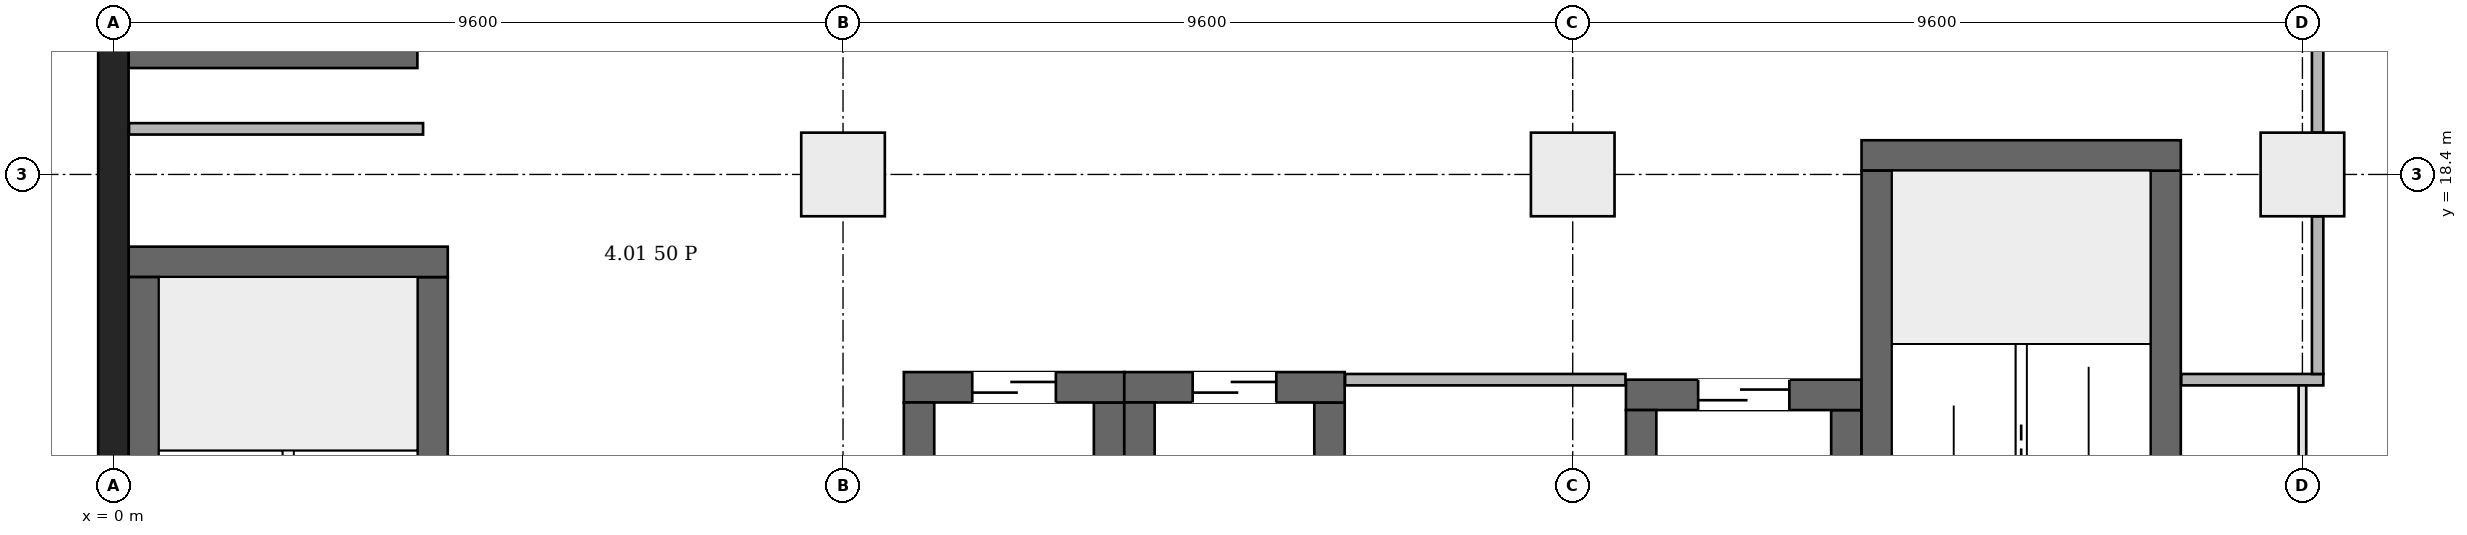
"""IFC4 building model, lengths in metres.
Left out: names, types, materials, properties, quantities, classifications, styles, units other than length and angle.
Written with IfcOpenShell. Run it as: python <this file> out.ifc"""

import sys

from ifc_helpers import new_model, si_unit, direction, frame, frame_2d, origin, origin_2d, place, context, subcontext, project, spatial, rectangle, extrude, element, fill, save


model = new_model("IFC4")
c1 = context("Model", 3, precision=1e-05, world=origin(), true_north=direction((0.0, 1.0)))
c2 = subcontext(c1, "Body", "Model", "MODEL_VIEW")
j1 = project(units=[si_unit("LENGTHUNIT", "METRE"), si_unit("PLANEANGLEUNIT", "RADIAN")], contexts=[c1])
p1 = place(None, origin())
s1 = spatial("IfcSite", under=j1, at=p1, CompositionType="ELEMENT")
p2 = place(p1, origin())
s2 = spatial("IfcBuilding", under=s1, at=p2, CompositionType="ELEMENT")
p3 = place(p2, frame((0.0, 0.0, 26.7)))
s3 = spatial("IfcBuildingStorey", under=s2, at=p3, CompositionType="ELEMENT", Elevation=26.7)
p4 = place(p3, frame((0.0, -0.2, 0.0), z_axis=(0.0, 0.0, 1.0), x_axis=(0.0, 1.0, 0.0)))
e1 = element("IfcWall", 1, at=p4, inside=s3, PredefinedType="SHEAR", context=c2, shape_type="SweptSolid", body=[
    extrude(rectangle(XDim=46.88, YDim=0.4, at=frame_2d((23.44, 0.0))), origin(), (0.0, 0.0, 1.0), 5.2),
])
p5 = place(p3, frame((0.2, 17.25, 0.0), z_axis=(0.0, 0.0, 1.0), x_axis=(1.0, 0.0, 0.0)))
e2 = element("IfcWall", 2, at=p5, inside=s3, PredefinedType="SHEAR", context=c2, shape_type="SweptSolid", body=[
    extrude(rectangle(XDim=4.2, YDim=0.4, at=frame_2d((2.1, 0.0))), origin(), (0.0, 0.0, 1.0), 5.2),
])
for number, where, z_axis, x_axis in (
    (3, (0.4, 10.45, 0.0), (0.0, 0.0, 1.0), (0.0, 1.0, 0.0)),
    (4, (4.2, 10.45, 0.0), (0.0, 0.0, 1.0), (0.0, 1.0, 0.0)),
):
    element("IfcWall", number, at=place(p3, frame(where, z_axis=z_axis, x_axis=x_axis)), inside=s3, PredefinedType="SHEAR", context=c2, shape_type="SweptSolid", body=[
        extrude(rectangle(XDim=6.6, YDim=0.4, at=frame_2d((3.3, 0.0))), origin(), (0.0, 0.0, 1.0), 5.2),
    ])
p6 = place(p3, frame((23.0, 18.65, 0.0), z_axis=(0.0, 0.0, 1.0), x_axis=(1.0, 0.0, 0.0)))
e5 = element("IfcWall", 5, at=p6, inside=s3, PredefinedType="SHEAR", context=c2, shape_type="SweptSolid", body=[
    extrude(rectangle(XDim=4.2, YDim=0.4, at=frame_2d((2.1, 0.0))), origin(), (0.0, 0.0, 1.0), 5.2),
])
for number, where, z_axis, x_axis in (
    (6, (23.2, 11.85, 0.0), (0.0, 0.0, 1.0), (0.0, 1.0, 0.0)),
    (7, (27.0, 11.85, 0.0), (0.0, 0.0, 1.0), (0.0, 1.0, 0.0)),
):
    element("IfcWall", number, at=place(p3, frame(where, z_axis=z_axis, x_axis=x_axis)), inside=s3, PredefinedType="SHEAR", context=c2, shape_type="SweptSolid", body=[
        extrude(rectangle(XDim=6.6, YDim=0.4, at=frame_2d((3.3, 0.0))), origin(), (0.0, 0.0, 1.0), 5.2),
    ])
p7 = place(p3, frame((0.2, 19.975, 0.0), z_axis=(0.0, 0.0, 1.0), x_axis=(1.0, 0.0, 0.0)))
e8 = element("IfcWall", 8, at=p7, inside=s3, PredefinedType="SHEAR", context=c2, shape_type="SweptSolid", body=[
    extrude(rectangle(XDim=3.8, YDim=0.35, at=frame_2d((1.9, 0.0))), origin(), (0.0, 0.0, 1.0), 5.2),
])
p8 = place(p3, frame((10.4, 15.6, 0.0), z_axis=(0.0, 0.0, 1.0), x_axis=(1.0, 0.0, 0.0)))
e9 = element("IfcWall", 9, at=p8, inside=s3, PredefinedType="SHEAR", context=c2, shape_type="SweptSolid", body=[
    extrude(rectangle(XDim=2.9, YDim=0.4, at=frame_2d((1.45, 0.0))), origin(), (0.0, 0.0, 1.0), 5.2),
])
p9 = place(p8, frame((0.9, 0.0, 0.0)))
e10 = element("IfcOpeningElement", 10, at=p9, cuts=e9, PredefinedType="OPENING", context=c2, shape_type="SweptSolid", body=[
    extrude(rectangle(XDim=1.1, YDim=2.1, at=frame_2d((0.55, 1.05))), frame((0.0, 0.21, 0.0), z_axis=(0.0, -1.0, 0.0), x_axis=(1.0, 0.0, 0.0)), (0.0, 0.0, 1.0), 0.42),
])
for number, where, z_axis, x_axis in (
    (11, (10.6, 12.4, 0.0), (0.0, 0.0, 1.0), (0.0, 1.0, 0.0)),
    (12, (13.1, 12.4, 0.0), (0.0, 0.0, 1.0), (0.0, 1.0, 0.0)),
):
    element("IfcWall", number, at=place(p3, frame(where, z_axis=z_axis, x_axis=x_axis)), inside=s3, PredefinedType="SHEAR", context=c2, shape_type="SweptSolid", body=[
        extrude(rectangle(XDim=3.0, YDim=0.4, at=frame_2d((1.5, 0.0))), origin(), (0.0, 0.0, 1.0), 5.2),
    ])
p10 = place(p3, frame((13.3, 15.6, 0.0), z_axis=(0.0, 0.0, 1.0), x_axis=(1.0, 0.0, 0.0)))
e13 = element("IfcWall", 13, at=p10, inside=s3, PredefinedType="SHEAR", context=c2, shape_type="SweptSolid", body=[
    extrude(rectangle(XDim=2.9, YDim=0.4, at=frame_2d((1.45, 0.0))), origin(), (0.0, 0.0, 1.0), 5.2),
])
p11 = place(p10, frame((0.9, 0.0, 0.0)))
e14 = element("IfcOpeningElement", 14, at=p11, cuts=e13, PredefinedType="OPENING", context=c2, shape_type="SweptSolid", body=[
    extrude(rectangle(XDim=1.1, YDim=2.1, at=frame_2d((0.55, 1.05))), frame((0.0, 0.21, 0.0), z_axis=(0.0, -1.0, 0.0), x_axis=(1.0, 0.0, 0.0)), (0.0, 0.0, 1.0), 0.42),
])
for number, where, z_axis, x_axis in (
    (15, (13.5, 12.4, 0.0), (0.0, 0.0, 1.0), (0.0, 1.0, 0.0)),
    (16, (16.0, 12.4, 0.0), (0.0, 0.0, 1.0), (0.0, 1.0, 0.0)),
):
    element("IfcWall", number, at=place(p3, frame(where, z_axis=z_axis, x_axis=x_axis)), inside=s3, PredefinedType="SHEAR", context=c2, shape_type="SweptSolid", body=[
        extrude(rectangle(XDim=3.0, YDim=0.4, at=frame_2d((1.5, 0.0))), origin(), (0.0, 0.0, 1.0), 5.2),
    ])
p12 = place(p3, frame((19.9, 15.5, 0.0), z_axis=(0.0, 0.0, 1.0), x_axis=(1.0, 0.0, 0.0)))
e17 = element("IfcWall", 17, at=p12, inside=s3, PredefinedType="SHEAR", context=c2, shape_type="SweptSolid", body=[
    extrude(rectangle(XDim=3.1, YDim=0.4, at=frame_2d((1.55, 0.0))), origin(), (0.0, 0.0, 1.0), 5.2),
])
p13 = place(p12, frame((0.95, 0.0, 0.0)))
e18 = element("IfcOpeningElement", 18, at=p13, cuts=e17, PredefinedType="OPENING", context=c2, shape_type="SweptSolid", body=[
    extrude(rectangle(XDim=1.2, YDim=2.1, at=frame_2d((0.6, 1.05))), frame((0.0, 0.21, 0.0), z_axis=(0.0, -1.0, 0.0), x_axis=(1.0, 0.0, 0.0)), (0.0, 0.0, 1.0), 0.42),
])
for number, where, z_axis, x_axis in (
    (19, (20.1, 11.9, 0.0), (0.0, 0.0, 1.0), (0.0, 1.0, 0.0)),
    (20, (22.8, 11.9, 0.0), (0.0, 0.0, 1.0), (0.0, 1.0, 0.0)),
):
    element("IfcWall", number, at=place(p3, frame(where, z_axis=z_axis, x_axis=x_axis)), inside=s3, PredefinedType="SHEAR", context=c2, shape_type="SweptSolid", body=[
        extrude(rectangle(XDim=3.4, YDim=0.4, at=frame_2d((1.7, 0.0))), origin(), (0.0, 0.0, 1.0), 5.2),
    ])
for number, where, z_axis, x_axis in (
    (21, (9.6, 18.4, 0.0), (0.0, 0.0, 1.0), (1.0, 0.0, 0.0)),
    (22, (19.2, 18.4, 0.0), (0.0, 0.0, 1.0), (1.0, 0.0, 0.0)),
    (23, (28.8, 18.4, 0.0), (0.0, 0.0, 1.0), (1.0, 0.0, 0.0)),
):
    element("IfcColumn", number, at=place(p3, frame(where, z_axis=z_axis, x_axis=x_axis)), inside=s3, PredefinedType="COLUMN", context=c2, shape_type="SweptSolid", body=[
        extrude(rectangle(XDim=1.1, YDim=1.1, at=origin_2d()), origin(), (0.0, 0.0, 1.0), 5.2),
    ])
p14 = place(p3, frame((0.206, 19.0, 0.0), z_axis=(0.0, 0.0, 1.0), x_axis=(1.0, 0.0, 0.0)))
e24 = element("IfcWall", 24, at=p14, inside=s3, PredefinedType="PARTITIONING", context=c2, shape_type="SweptSolid", body=[
    extrude(rectangle(XDim=3.869, YDim=0.15, at=frame_2d((1.935, 0.0))), origin(), (0.0, 0.0, 1.0), 4.85),
])
p15 = place(p3, frame((16.206, 15.7, 0.0), z_axis=(0.0, 0.0, 1.0), x_axis=(1.0, 0.0, 0.0)))
e25 = element("IfcWall", 25, at=p15, inside=s3, PredefinedType="PARTITIONING", context=c2, shape_type="SweptSolid", body=[
    extrude(rectangle(XDim=3.688, YDim=0.15, at=frame_2d((1.844, 0.0))), origin(), (0.0, 0.0, 1.0), 4.85),
])
p16 = place(p3, frame((27.206, 15.7, 0.0), z_axis=(0.0, 0.0, 1.0), x_axis=(1.0, 0.0, 0.0)))
e26 = element("IfcWall", 26, at=p16, inside=s3, PredefinedType="PARTITIONING", context=c2, shape_type="SweptSolid", body=[
    extrude(rectangle(XDim=1.869, YDim=0.15, at=frame_2d((0.935, 0.0))), origin(), (0.0, 0.0, 1.0), 4.85),
])
p17 = place(p3, frame((28.8, 11.575, 0.0), z_axis=(0.0, 0.0, 1.0), x_axis=(0.0, 1.0, 0.0)))
e27 = element("IfcWall", 27, at=p17, inside=s3, PredefinedType="PARTITIONING", context=c2, shape_type="SweptSolid", body=[
    extrude(rectangle(XDim=4.05, YDim=0.1, at=frame_2d((2.025, 0.0))), origin(), (0.0, 0.0, 1.0), 4.45),
])
p18 = place(p3, frame((29.0, 15.775, 0.0), z_axis=(0.0, 0.0, 1.0), x_axis=(0.0, 1.0, 0.0)))
e28 = element("IfcWall", 28, at=p18, inside=s3, PredefinedType="PARTITIONING", context=c2, shape_type="SweptSolid", body=[
    extrude(rectangle(XDim=2.075, YDim=0.15, at=frame_2d((1.038, 0.0))), origin(), (0.0, 0.0, 1.0), 4.45),
])
p19 = place(p3, frame((29.0, 18.95, 0.0), z_axis=(0.0, 0.0, 1.0), x_axis=(0.0, 1.0, 0.0)))
e29 = element("IfcWall", 29, at=p19, inside=s3, PredefinedType="PARTITIONING", context=c2, shape_type="SweptSolid", body=[
    extrude(rectangle(XDim=2.025, YDim=0.15, at=frame_2d((1.013, 0.0))), origin(), (0.0, 0.0, 1.0), 4.45),
])
p20 = place(p9, origin())
e30 = element("IfcDoor", 30, at=p20, inside=s3, OperationType="DOUBLE_DOOR_SLIDING", PredefinedType="DOOR", context=c2, shape_type="SweptSolid", body=[
    extrude(rectangle(XDim=1.1, YDim=2.1, at=frame_2d((0.55, 1.05))), frame((0.0, 0.025, 0.0), z_axis=(0.0, -1.0, 0.0), x_axis=(1.0, 0.0, 0.0)), (0.0, 0.0, 1.0), 0.05),
])
fill(e10, e30)
p21 = place(p11, origin())
e31 = element("IfcDoor", 31, at=p21, inside=s3, OperationType="DOUBLE_DOOR_SLIDING", PredefinedType="DOOR", context=c2, shape_type="SweptSolid", body=[
    extrude(rectangle(XDim=1.1, YDim=2.1, at=frame_2d((0.55, 1.05))), frame((0.0, 0.025, 0.0), z_axis=(0.0, -1.0, 0.0), x_axis=(1.0, 0.0, 0.0)), (0.0, 0.0, 1.0), 0.05),
])
fill(e14, e31)
p22 = place(p13, origin())
e32 = element("IfcDoor", 32, at=p22, inside=s3, OperationType="DOUBLE_DOOR_SLIDING", PredefinedType="DOOR", context=c2, shape_type="SweptSolid", body=[
    extrude(rectangle(XDim=1.2, YDim=2.1, at=frame_2d((0.6, 1.05))), frame((0.0, 0.025, 0.0), z_axis=(0.0, -1.0, 0.0), x_axis=(1.0, 0.0, 0.0)), (0.0, 0.0, 1.0), 0.05),
])
fill(e18, e32)
save(model, sys.argv[1])
